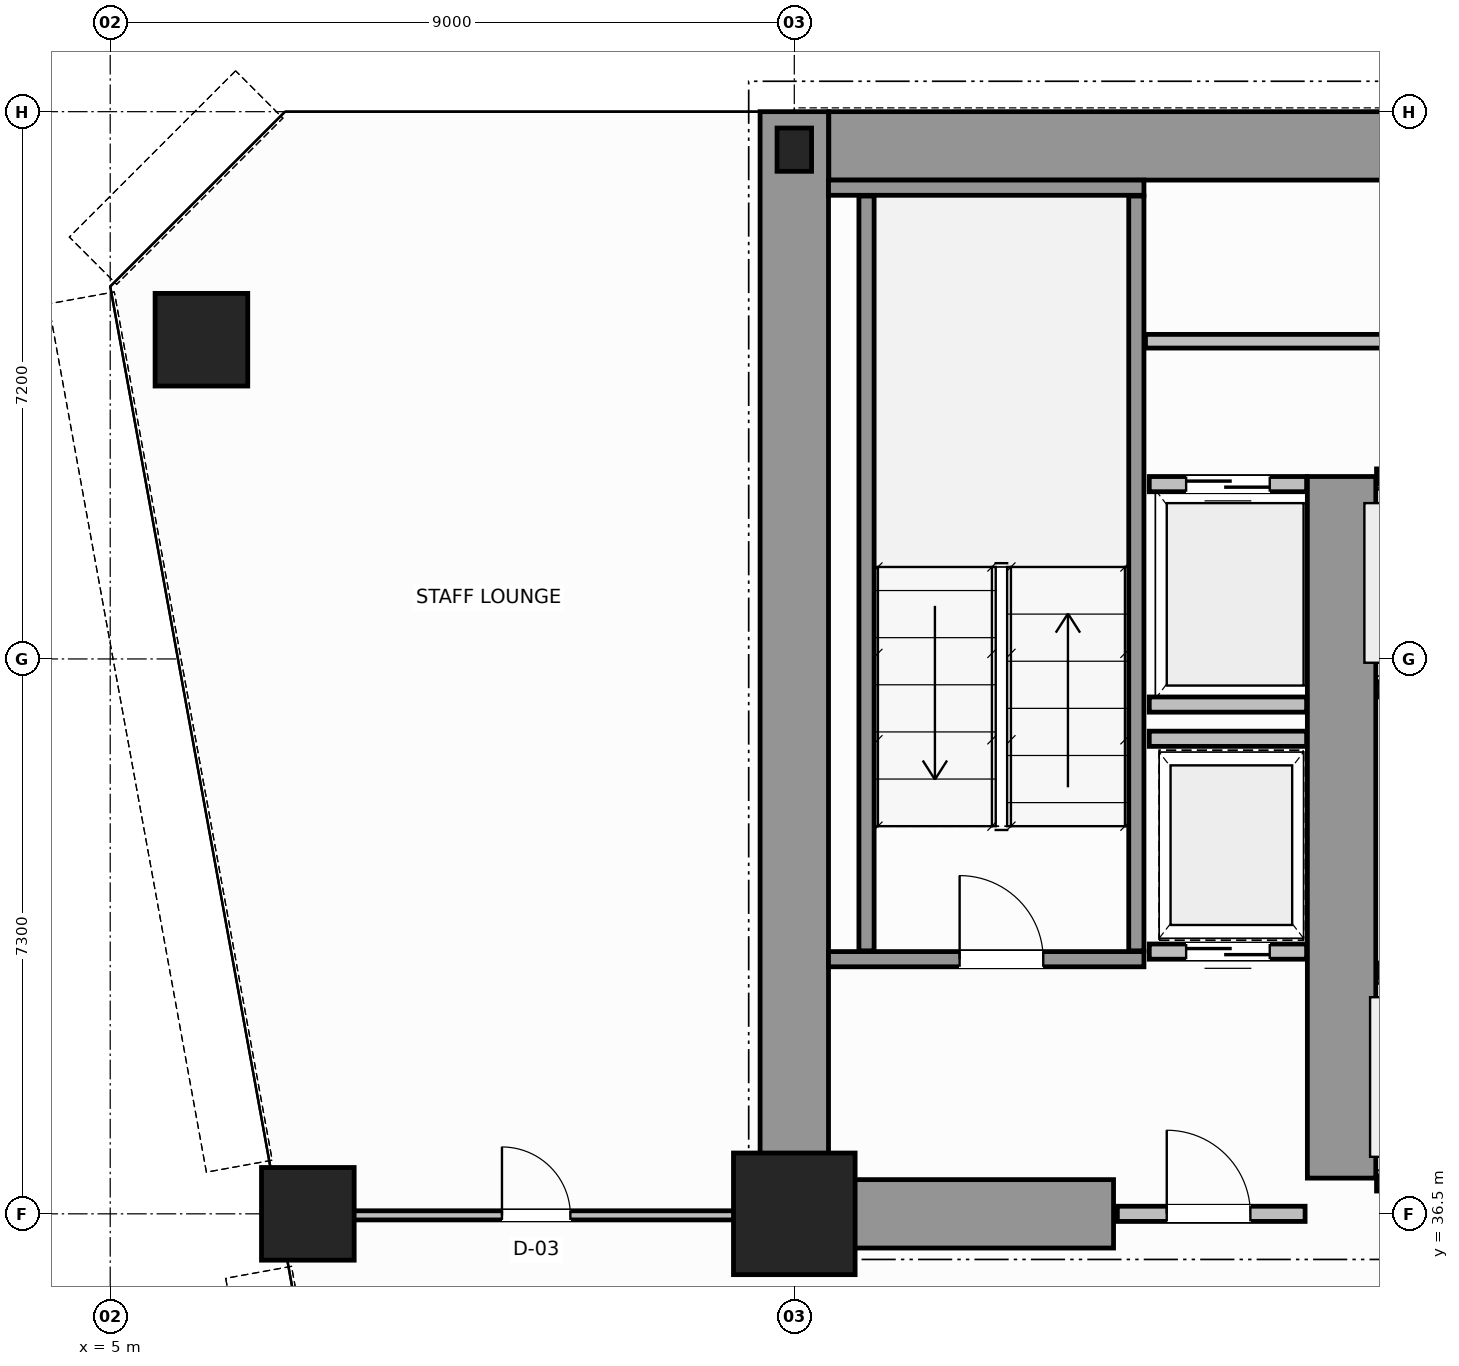
"""IFC4 building model, lengths in metres.
Left out: names, types, materials, properties, quantities, classifications, styles, units other than length and angle.
Written with IfcOpenShell. Run it as: python <this file> out.ifc"""

import sys

from ifc_helpers import new_model, si_unit, direction, frame, frame_2d, origin, origin_2d, place, context, subcontext, project, spatial, rectangle, hollow_circle, i_section, extrude, source, transform, mapped, element, fill, save


model = new_model("IFC4")
c1 = context("Model", 3, precision=1e-05, world=origin(), true_north=direction((0.0, 1.0)))
c2 = subcontext(c1, "Body", "Model", "MODEL_VIEW")
j1 = project(units=[si_unit("LENGTHUNIT", "METRE"), si_unit("PLANEANGLEUNIT", "RADIAN")], contexts=[c1])
p1 = place(None, origin())
s1 = spatial("IfcSite", under=j1, at=p1, CompositionType="ELEMENT")
p2 = place(p1, origin())
s2 = spatial("IfcBuilding", under=s1, at=p2, CompositionType="ELEMENT")
p3 = place(p2, frame((0.0, 0.0, 41.6)))
s3 = spatial("IfcBuildingStorey", under=s2, at=p3, CompositionType="ELEMENT", Elevation=41.6)
m1 = source(origin(), c2, "Body", "SweptSolid", [
    extrude(rectangle(XDim=1.6, YDim=1.6, at=origin_2d()), origin(), (0.0, 0.0, 1.0), 3.8),
])
p4 = place(p3, frame((14.0, 36.5, 0.0), z_axis=(0.0, 0.0, 1.0), x_axis=(1.0, 0.0, 0.0)))
e1 = element("IfcColumn", 1, at=p4, inside=s3, PredefinedType="COLUMN", context=c2, shape_type="MappedRepresentation", body=[
    mapped(m1, transform((0.0, 0.0, 0.0), scale=1.0)),
])
m2 = source(origin(), c2, "Body", "SweptSolid", [
    extrude(i_section(OverallWidth=0.454, OverallDepth=0.569, WebThickness=0.078, FlangeThickness=0.08, FilletRadius=0.015, at=origin_2d()), origin(), (0.0, 0.0, 1.0), 3.8),
])
p5 = place(p3, frame((14.0, 50.5, 0.0), z_axis=(0.0, 0.0, 1.0), x_axis=(1.0, 0.0, 0.0)))
e2 = element("IfcColumn", 2, at=p5, inside=s3, PredefinedType="COLUMN", context=c2, shape_type="MappedRepresentation", body=[
    mapped(m2, transform((0.0, 0.0, 0.0), scale=1.0)),
])
m3 = source(origin(), c2, "Body", "SweptSolid", [
    extrude(hollow_circle(Radius=0.61, WallThickness=0.05, at=origin_2d()), origin(), (0.0, 0.0, 1.0), 3.8),
])
for number, where, z_axis, x_axis in (
    (3, (6.2, 48.0, 0.0), (0.0, 0.0, 1.0), (1.0, 0.0, 0.0)),
    (4, (7.6, 36.5, 0.0), (0.0, 0.0, 1.0), (1.0, 0.0, 0.0)),
):
    element("IfcColumn", number, at=place(p3, frame(where, z_axis=z_axis, x_axis=x_axis)), inside=s3, PredefinedType="COLUMN", context=c2, shape_type="MappedRepresentation", body=[
        mapped(m3, transform((0.0, 0.0, 0.0), scale=1.0)),
    ])
p6 = place(p3, frame((14.454, 50.55, 0.0), z_axis=(0.0, 0.0, 1.0), x_axis=(1.0, 0.0, 0.0)))
e5 = element("IfcWall", 5, at=p6, inside=s3, PredefinedType="SHEAR", context=c2, shape_type="SweptSolid", body=[
    extrude(rectangle(XDim=19.544, YDim=0.9, at=frame_2d((9.772, 0.0))), origin(), (0.0, 0.0, 1.0), 3.8),
])
p7 = place(p3, frame((14.0, 36.5, 0.0), z_axis=(0.0, 0.0, 1.0), x_axis=(0.0, 1.0, 0.0)))
e6 = element("IfcWall", 6, at=p7, inside=s3, PredefinedType="SHEAR", context=c2, shape_type="SweptSolid", body=[
    extrude(rectangle(XDim=14.5, YDim=0.9, at=frame_2d((7.25, 0.0))), origin(), (0.0, 0.0, 1.0), 3.8),
])
p8 = place(p3, frame((14.47, 36.5, 0.0), z_axis=(0.0, 0.0, 1.0), x_axis=(1.0, 0.0, 0.0)))
e7 = element("IfcWall", 7, at=p8, inside=s3, PredefinedType="SHEAR", context=c2, shape_type="SweptSolid", body=[
    extrude(rectangle(XDim=3.73, YDim=0.9, at=frame_2d((1.865, 0.0))), origin(), (0.0, 0.0, 1.0), 2.38),
])
p9 = place(p3, frame((21.2, 36.97, 0.0), z_axis=(0.0, 0.0, 1.0), x_axis=(0.0, 1.0, 0.0)))
e8 = element("IfcWall", 8, at=p9, inside=s3, PredefinedType="SHEAR", context=c2, shape_type="SweptSolid", body=[
    extrude(rectangle(XDim=9.23, YDim=0.9, at=frame_2d((4.615, 0.0))), origin(), (0.0, 0.0, 1.0), 3.8),
])
p10 = place(p3, frame((14.45, 39.85, 0.0), z_axis=(0.0, 0.0, 1.0), x_axis=(1.0, 0.0, 0.0)))
e9 = element("IfcWall", 9, at=p10, inside=s3, PredefinedType="SOLIDWALL", context=c2, shape_type="SweptSolid", body=[
    extrude(rectangle(XDim=4.15, YDim=0.2, at=frame_2d((2.075, 0.0))), origin(), (0.0, 0.0, 1.0), 3.8),
])
p11 = place(p10, frame((1.725, 0.0, 0.0)))
e10 = element("IfcOpeningElement", 10, at=p11, cuts=e9, PredefinedType="OPENING", context=c2, shape_type="SweptSolid", body=[
    extrude(rectangle(XDim=1.1, YDim=2.15, at=frame_2d((0.55, 1.075))), frame((0.0, 0.11, 0.0), z_axis=(0.0, -1.0, 0.0), x_axis=(1.0, 0.0, 0.0)), (0.0, 0.0, 1.0), 0.22),
])
p12 = place(p3, frame((14.45, 50.0, 0.0), z_axis=(0.0, 0.0, 1.0), x_axis=(1.0, 0.0, 0.0)))
e11 = element("IfcWall", 11, at=p12, inside=s3, PredefinedType="SOLIDWALL", context=c2, shape_type="SweptSolid", body=[
    extrude(rectangle(XDim=4.15, YDim=0.2, at=frame_2d((2.075, 0.0))), origin(), (0.0, 0.0, 1.0), 3.8),
])
for number, where, z_axis, x_axis in (
    (12, (14.95, 39.96, 0.0), (0.0, 0.0, 1.0), (0.0, 1.0, 0.0)),
    (13, (18.5, 39.96, 0.0), (0.0, 0.0, 1.0), (0.0, 1.0, 0.0)),
):
    element("IfcWall", number, at=place(p3, frame(where, z_axis=z_axis, x_axis=x_axis)), inside=s3, PredefinedType="SOLIDWALL", context=c2, shape_type="SweptSolid", body=[
        extrude(rectangle(XDim=9.93, YDim=0.2, at=frame_2d((4.965, 0.0))), origin(), (0.0, 0.0, 1.0), 3.8),
    ])
p13 = place(p3, frame((18.25, 36.5, 0.0), z_axis=(0.0, 0.0, 1.0), x_axis=(1.0, 0.0, 0.0)))
e14 = element("IfcWall", 14, at=p13, inside=s3, PredefinedType="SOLIDWALL", context=c2, shape_type="SweptSolid", body=[
    extrude(rectangle(XDim=2.47, YDim=0.2, at=frame_2d((1.235, 0.0))), origin(), (0.0, 0.0, 1.0), 2.37),
])
p14 = place(p13, frame((0.65, 0.0, 0.0)))
e15 = element("IfcOpeningElement", 15, at=p14, cuts=e14, PredefinedType="OPENING", context=c2, shape_type="SweptSolid", body=[
    extrude(rectangle(XDim=1.1, YDim=2.15, at=frame_2d((0.55, 1.075))), frame((0.0, 0.11, 0.0), z_axis=(0.0, -1.0, 0.0), x_axis=(1.0, 0.0, 0.0)), (0.0, 0.0, 1.0), 0.22),
])
p15 = place(p3, frame((21.66, 39.7, 0.0), z_axis=(0.0, 0.0, 1.0), x_axis=(1.0, 0.0, 0.0)))
e16 = element("IfcWall", 16, at=p15, inside=s3, PredefinedType="SOLIDWALL", context=c2, shape_type="SweptSolid", body=[
    extrude(rectangle(XDim=1.77, YDim=0.2, at=frame_2d((0.885, 0.0))), origin(), (0.0, 0.0, 1.0), 3.58),
])
p16 = place(p15, frame((0.335, 0.0, 0.0)))
e17 = element("IfcOpeningElement", 17, at=p16, cuts=e16, PredefinedType="OPENING", context=c2, shape_type="SweptSolid", body=[
    extrude(rectangle(XDim=1.1, YDim=2.15, at=frame_2d((0.55, 1.075))), frame((0.0, 0.11, 0.0), z_axis=(0.0, -1.0, 0.0), x_axis=(1.0, 0.0, 0.0)), (0.0, 0.0, 1.0), 0.22),
])
p17 = place(p3, frame((21.66, 36.9, 0.0), z_axis=(0.0, 0.0, 1.0), x_axis=(1.0, 0.0, 0.0)))
e18 = element("IfcWall", 18, at=p17, inside=s3, PredefinedType="SOLIDWALL", context=c2, shape_type="SweptSolid", body=[
    extrude(rectangle(XDim=1.77, YDim=0.2, at=frame_2d((0.885, 0.0))), origin(), (0.0, 0.0, 1.0), 2.37),
])
p18 = place(p3, frame((21.66, 43.4, 0.0), z_axis=(0.0, 0.0, 1.0), x_axis=(1.0, 0.0, 0.0)))
e19 = element("IfcWall", 19, at=p18, inside=s3, PredefinedType="SOLIDWALL", context=c2, shape_type="SweptSolid", body=[
    extrude(rectangle(XDim=1.65, YDim=0.2, at=frame_2d((0.825, 0.0))), origin(), (0.0, 0.0, 1.0), 3.58),
])
p19 = place(p18, frame((0.275, 0.0, 0.0)))
e20 = element("IfcOpeningElement", 20, at=p19, cuts=e19, PredefinedType="OPENING", context=c2, shape_type="SweptSolid", body=[
    extrude(rectangle(XDim=1.1, YDim=2.15, at=frame_2d((0.55, 1.075))), frame((0.0, 0.11, 0.0), z_axis=(0.0, -1.0, 0.0), x_axis=(1.0, 0.0, 0.0)), (0.0, 0.0, 1.0), 0.22),
])
p20 = place(p3, frame((21.66, 46.2, 0.0), z_axis=(0.0, 0.0, 1.0), x_axis=(1.0, 0.0, 0.0)))
e21 = element("IfcWall", 21, at=p20, inside=s3, PredefinedType="SOLIDWALL", context=c2, shape_type="SweptSolid", body=[
    extrude(rectangle(XDim=1.65, YDim=0.2, at=frame_2d((0.825, 0.0))), origin(), (0.0, 0.0, 1.0), 3.58),
])
p21 = place(p3, frame((18.67, 46.1, 0.0), z_axis=(0.0, 0.0, 1.0), x_axis=(1.0, 0.0, 0.0)))
e22 = element("IfcWall", 22, at=p21, inside=s3, PredefinedType="SOLIDWALL", context=c2, shape_type="SweptSolid", body=[
    extrude(rectangle(XDim=2.07, YDim=0.2, at=frame_2d((1.035, 0.0))), origin(), (0.0, 0.0, 1.0), 3.58),
])
p22 = place(p21, frame((0.485, 0.0, 0.0)))
e23 = element("IfcOpeningElement", 23, at=p22, cuts=e22, PredefinedType="OPENING", context=c2, shape_type="SweptSolid", body=[
    extrude(rectangle(XDim=1.1, YDim=2.15, at=frame_2d((0.55, 1.075))), frame((0.0, 0.11, 0.0), z_axis=(0.0, -1.0, 0.0), x_axis=(1.0, 0.0, 0.0)), (0.0, 0.0, 1.0), 0.22),
])
p23 = place(p3, frame((18.67, 43.2, 0.0), z_axis=(0.0, 0.0, 1.0), x_axis=(1.0, 0.0, 0.0)))
e24 = element("IfcWall", 24, at=p23, inside=s3, PredefinedType="SOLIDWALL", context=c2, shape_type="SweptSolid", body=[
    extrude(rectangle(XDim=2.07, YDim=0.2, at=frame_2d((1.035, 0.0))), origin(), (0.0, 0.0, 1.0), 3.58),
])
p24 = place(p3, frame((18.67, 39.95, 0.0), z_axis=(0.0, 0.0, 1.0), x_axis=(1.0, 0.0, 0.0)))
e25 = element("IfcWall", 25, at=p24, inside=s3, PredefinedType="SOLIDWALL", context=c2, shape_type="SweptSolid", body=[
    extrude(rectangle(XDim=2.07, YDim=0.2, at=frame_2d((1.035, 0.0))), origin(), (0.0, 0.0, 1.0), 3.58),
])
p25 = place(p24, frame((0.485, 0.0, 0.0)))
e26 = element("IfcOpeningElement", 26, at=p25, cuts=e25, PredefinedType="OPENING", context=c2, shape_type="SweptSolid", body=[
    extrude(rectangle(XDim=1.1, YDim=2.15, at=frame_2d((0.55, 1.075))), frame((0.0, 0.11, 0.0), z_axis=(0.0, -1.0, 0.0), x_axis=(1.0, 0.0, 0.0)), (0.0, 0.0, 1.0), 0.22),
])
p26 = place(p3, frame((18.67, 42.75, 0.0), z_axis=(0.0, 0.0, 1.0), x_axis=(1.0, 0.0, 0.0)))
e27 = element("IfcWall", 27, at=p26, inside=s3, PredefinedType="SOLIDWALL", context=c2, shape_type="SweptSolid", body=[
    extrude(rectangle(XDim=2.07, YDim=0.2, at=frame_2d((1.035, 0.0))), origin(), (0.0, 0.0, 1.0), 3.58),
])
p27 = place(p3, frame((18.62, 47.98, 0.0), z_axis=(0.0, 0.0, 1.0), x_axis=(1.0, 0.0, 0.0)))
e28 = element("IfcWall", 28, at=p27, inside=s3, PredefinedType="PLUMBINGWALL", context=c2, shape_type="SweptSolid", body=[
    extrude(rectangle(XDim=20.06, YDim=0.18, at=frame_2d((10.03, 0.0))), origin(), (0.0, 0.0, 1.0), 3.58),
])
p28 = place(p27, frame((3.5, 0.0, 0.0)))
e29 = element("IfcOpeningElement", 29, at=p28, cuts=e28, PredefinedType="OPENING", context=c2, shape_type="SweptSolid", body=[
    extrude(rectangle(XDim=0.9, YDim=2.15, at=frame_2d((0.45, 1.075))), frame((0.0, 0.1, 0.0), z_axis=(0.0, -1.0, 0.0), x_axis=(1.0, 0.0, 0.0)), (0.0, 0.0, 1.0), 0.2),
])
p29 = place(p27, frame((10.8, 0.0, 0.0)))
e30 = element("IfcOpeningElement", 30, at=p29, cuts=e28, PredefinedType="OPENING", context=c2, shape_type="SweptSolid", body=[
    extrude(rectangle(XDim=0.9, YDim=2.15, at=frame_2d((0.45, 1.075))), frame((0.0, 0.1, 0.0), z_axis=(0.0, -1.0, 0.0), x_axis=(1.0, 0.0, 0.0)), (0.0, 0.0, 1.0), 0.2),
])
p30 = place(p27, frame((16.8, 0.0, 0.0)))
e31 = element("IfcOpeningElement", 31, at=p30, cuts=e28, PredefinedType="OPENING", context=c2, shape_type="SweptSolid", body=[
    extrude(rectangle(XDim=0.9, YDim=2.15, at=frame_2d((0.45, 1.075))), frame((0.0, 0.1, 0.0), z_axis=(0.0, -1.0, 0.0), x_axis=(1.0, 0.0, 0.0)), (0.0, 0.0, 1.0), 0.2),
])
p31 = place(p3, frame((7.268, 36.48, 0.0), z_axis=(0.0, 0.0, 1.0), x_axis=(1.0, 0.0, 0.0)))
e32 = element("IfcWall", 32, at=p31, inside=s3, PredefinedType="PARTITIONING", context=c2, shape_type="SweptSolid", body=[
    extrude(rectangle(XDim=6.672, YDim=0.12, at=frame_2d((3.336, 0.0))), origin(), (0.0, 0.0, 1.0), 2.77),
])
p32 = place(p31, frame((2.886, 0.0, 0.0)))
e33 = element("IfcOpeningElement", 33, at=p32, cuts=e32, PredefinedType="OPENING", context=c2, shape_type="SweptSolid", body=[
    extrude(rectangle(XDim=0.9, YDim=2.15, at=frame_2d((0.45, 1.075))), frame((0.0, 0.07, 0.0), z_axis=(0.0, -1.0, 0.0), x_axis=(1.0, 0.0, 0.0)), (0.0, 0.0, 1.0), 0.14),
])
m4 = source(origin(), c2, "Body", "SweptSolid", [
    extrude(rectangle(XDim=1.1, YDim=2.15, at=frame_2d((0.55, 1.075))), frame((0.0, 0.025, 0.0), z_axis=(0.0, -1.0, 0.0), x_axis=(1.0, 0.0, 0.0)), (0.0, 0.0, 1.0), 0.05),
])
p33 = place(p11, origin())
e34 = element("IfcDoor", 34, at=p33, inside=s3, OperationType="SINGLE_SWING_LEFT", PredefinedType="DOOR", context=c2, shape_type="MappedRepresentation", body=[
    mapped(m4, transform((0.0, 0.0, 0.0), scale=1.0)),
])
fill(e10, e34)
p34 = place(p14, origin())
e35 = element("IfcDoor", 35, at=p34, inside=s3, OperationType="SINGLE_SWING_RIGHT", PredefinedType="DOOR", context=c2, shape_type="MappedRepresentation", body=[
    mapped(m4, transform((0.0, 0.0, 0.0), scale=1.0)),
])
fill(e15, e35)
p35 = place(p22, origin())
e36 = element("IfcDoor", 36, at=p35, inside=s3, OperationType="DOUBLE_DOOR_SLIDING", PredefinedType="DOOR", context=c2, shape_type="MappedRepresentation", body=[
    mapped(m4, transform((0.0, 0.0, 0.0), scale=1.0)),
])
fill(e23, e36)
p36 = place(p25, origin())
e37 = element("IfcDoor", 37, at=p36, inside=s3, OperationType="DOUBLE_DOOR_SLIDING", PredefinedType="DOOR", context=c2, shape_type="MappedRepresentation", body=[
    mapped(m4, transform((0.0, 0.0, 0.0), scale=1.0)),
])
fill(e26, e37)
m5 = source(origin(), c2, "Body", "SweptSolid", [
    extrude(rectangle(XDim=0.9, YDim=2.15, at=frame_2d((0.45, 1.075))), frame((0.0, 0.025, 0.0), z_axis=(0.0, -1.0, 0.0), x_axis=(1.0, 0.0, 0.0)), (0.0, 0.0, 1.0), 0.05),
])
p37 = place(p32, origin())
e38 = element("IfcDoor", 38, at=p37, inside=s3, OperationType="SINGLE_SWING_LEFT", PredefinedType="DOOR", context=c2, shape_type="MappedRepresentation", body=[
    mapped(m5, transform((0.0, 0.0, 0.0), scale=1.0)),
])
fill(e33, e38)
save(model, sys.argv[1])
